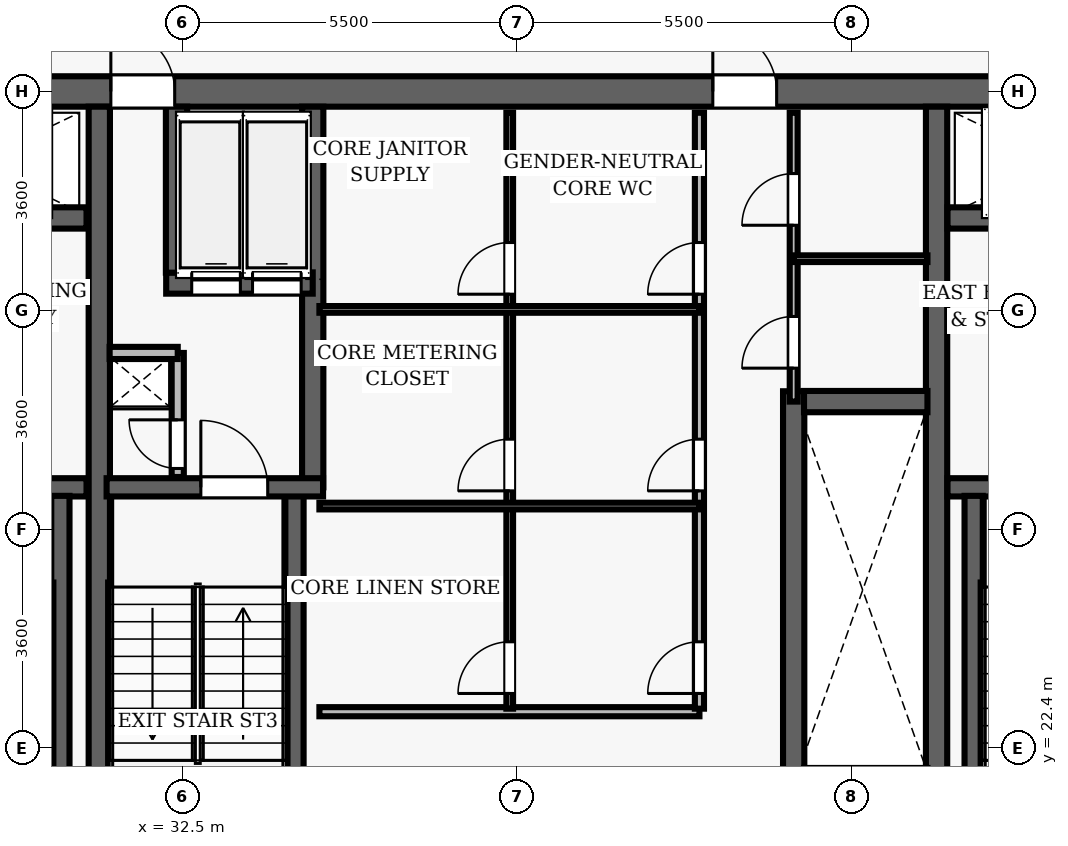
"""IFC4 building model, lengths in metres.
Left out: names, types, materials, properties, quantities, classifications, styles, units other than length and angle.
Written with IfcOpenShell. Run it as: python <this file> out.ifc"""

import sys

from ifc_helpers import new_model, si_unit, direction, frame, frame_2d, origin, place, context, subcontext, project, spatial, rectangle, extrude, element, fill, save


model = new_model("IFC4")
c1 = context("Model", 3, precision=1e-05, world=origin(), true_north=direction((0.0, 1.0)))
c2 = subcontext(c1, "Body", "Model", "MODEL_VIEW")
j1 = project(units=[si_unit("LENGTHUNIT", "METRE"), si_unit("PLANEANGLEUNIT", "RADIAN")], contexts=[c1])
p1 = place(None, origin())
s1 = spatial("IfcSite", under=j1, at=p1, CompositionType="ELEMENT")
p2 = place(p1, origin())
s2 = spatial("IfcBuilding", under=s1, at=p2, CompositionType="ELEMENT")
p3 = place(p2, frame((0.0, 0.0, 175.05)))
s3 = spatial("IfcBuildingStorey", under=s2, at=p3, CompositionType="ELEMENT", Elevation=175.05)
p4 = place(p3, frame((26.75, 33.2, 0.0), z_axis=(0.0, 0.0, 1.0), x_axis=(1.0, 0.0, 0.0)))
e1 = element("IfcWall", 1, at=p4, inside=s3, PredefinedType="SHEAR", context=c2, shape_type="SweptSolid", body=[
    extrude(rectangle(XDim=22.5, YDim=0.5, at=frame_2d((11.25, 0.0))), origin(), (0.0, 0.0, 1.0), 3.85),
])
p5 = place(p4, frame((4.57, 0.0, 0.0)))
e2 = element("IfcOpeningElement", 2, at=p5, cuts=e1, PredefinedType="OPENING", context=c2, shape_type="SweptSolid", body=[
    extrude(rectangle(XDim=1.05, YDim=2.15, at=frame_2d((0.525, 1.075))), frame((0.0, 0.26, 0.0), z_axis=(0.0, -1.0, 0.0), x_axis=(1.0, 0.0, 0.0)), (0.0, 0.0, 1.0), 0.52),
])
p6 = place(p4, frame((14.47, 0.0, 0.0)))
e3 = element("IfcOpeningElement", 3, at=p6, cuts=e1, PredefinedType="OPENING", context=c2, shape_type="SweptSolid", body=[
    extrude(rectangle(XDim=1.05, YDim=2.15, at=frame_2d((0.525, 1.075))), frame((0.0, 0.26, 0.0), z_axis=(0.0, -1.0, 0.0), x_axis=(1.0, 0.0, 0.0)), (0.0, 0.0, 1.0), 0.52),
])
for number, where, z_axis, x_axis in (
    (4, (31.13, 19.05, 0.0), (0.0, 0.0, 1.0), (0.0, 1.0, 0.0)),
    (5, (44.9, 19.05, 0.0), (0.0, 0.0, 1.0), (0.0, 1.0, 0.0)),
):
    element("IfcWall", number, at=place(p3, frame(where, z_axis=z_axis, x_axis=x_axis)), inside=s3, PredefinedType="SHEAR", context=c2, shape_type="SweptSolid", body=[
        extrude(rectangle(XDim=13.9, YDim=0.35, at=frame_2d((6.95, 0.0))), origin(), (0.0, 0.0, 1.0), 3.85),
    ])
p7 = place(p3, frame((27.25, 26.69, 0.0), z_axis=(0.0, 0.0, 1.0), x_axis=(1.0, 0.0, 0.0)))
e6 = element("IfcWall", 6, at=p7, inside=s3, PredefinedType="SHEAR", context=c2, shape_type="SweptSolid", body=[
    extrude(rectangle(XDim=3.67, YDim=0.3, at=frame_2d((1.835, 0.0))), origin(), (0.0, 0.0, 1.0), 3.85),
])
p8 = place(p7, frame((1.05, 0.0, 0.0)))
e7 = element("IfcOpeningElement", 7, at=p8, cuts=e6, PredefinedType="OPENING", context=c2, shape_type="SweptSolid", body=[
    extrude(rectangle(XDim=1.1, YDim=2.15, at=frame_2d((0.55, 1.075))), frame((0.0, 0.16, 0.0), z_axis=(0.0, -1.0, 0.0), x_axis=(1.0, 0.0, 0.0)), (0.0, 0.0, 1.0), 0.32),
])
p9 = place(p3, frame((30.49, 19.05, 0.0), z_axis=(0.0, 0.0, 1.0), x_axis=(0.0, 1.0, 0.0)))
e8 = element("IfcWall", 8, at=p9, inside=s3, PredefinedType="SHEAR", context=c2, shape_type="SweptSolid", body=[
    extrude(rectangle(XDim=7.5, YDim=0.3, at=frame_2d((3.75, 0.0))), origin(), (0.0, 0.0, 1.0), 3.85),
])
p10 = place(p3, frame((27.25, 31.12, 0.0), z_axis=(0.0, 0.0, 1.0), x_axis=(1.0, 0.0, 0.0)))
e9 = element("IfcWall", 9, at=p10, inside=s3, PredefinedType="SHEAR", context=c2, shape_type="SweptSolid", body=[
    extrude(rectangle(XDim=3.67, YDim=0.35, at=frame_2d((1.835, 0.0))), origin(), (0.0, 0.0, 1.0), 3.035),
])
p11 = place(p10, frame((1.25, 0.0, 0.0)))
e10 = element("IfcOpeningElement", 10, at=p11, cuts=e9, PredefinedType="OPENING", context=c2, shape_type="SweptSolid", body=[
    extrude(rectangle(XDim=1.1, YDim=2.15, at=frame_2d((0.55, 1.075))), frame((0.0, 0.185, 0.0), z_axis=(0.0, -1.0, 0.0), x_axis=(1.0, 0.0, 0.0)), (0.0, 0.0, 1.0), 0.37),
])
p12 = place(p3, frame((45.08, 26.69, 0.0), z_axis=(0.0, 0.0, 1.0), x_axis=(1.0, 0.0, 0.0)))
e11 = element("IfcWall", 11, at=p12, inside=s3, PredefinedType="SHEAR", context=c2, shape_type="SweptSolid", body=[
    extrude(rectangle(XDim=3.67, YDim=0.3, at=frame_2d((1.835, 0.0))), origin(), (0.0, 0.0, 1.0), 3.85),
])
p13 = place(p12, frame((1.05, 0.0, 0.0)))
e12 = element("IfcOpeningElement", 12, at=p13, cuts=e11, PredefinedType="OPENING", context=c2, shape_type="SweptSolid", body=[
    extrude(rectangle(XDim=1.1, YDim=2.15, at=frame_2d((0.55, 1.075))), frame((0.0, 0.16, 0.0), z_axis=(0.0, -1.0, 0.0), x_axis=(1.0, 0.0, 0.0)), (0.0, 0.0, 1.0), 0.32),
])
p14 = place(p3, frame((45.51, 19.05, 0.0), z_axis=(0.0, 0.0, 1.0), x_axis=(0.0, 1.0, 0.0)))
e13 = element("IfcWall", 13, at=p14, inside=s3, PredefinedType="SHEAR", context=c2, shape_type="SweptSolid", body=[
    extrude(rectangle(XDim=7.5, YDim=0.3, at=frame_2d((3.75, 0.0))), origin(), (0.0, 0.0, 1.0), 3.85),
])
p15 = place(p3, frame((45.08, 31.12, 0.0), z_axis=(0.0, 0.0, 1.0), x_axis=(1.0, 0.0, 0.0)))
e14 = element("IfcWall", 14, at=p15, inside=s3, PredefinedType="SHEAR", context=c2, shape_type="SweptSolid", body=[
    extrude(rectangle(XDim=3.67, YDim=0.35, at=frame_2d((1.835, 0.0))), origin(), (0.0, 0.0, 1.0), 3.035),
])
p16 = place(p15, frame((1.25, 0.0, 0.0)))
e15 = element("IfcOpeningElement", 15, at=p16, cuts=e14, PredefinedType="OPENING", context=c2, shape_type="SweptSolid", body=[
    extrude(rectangle(XDim=1.1, YDim=2.15, at=frame_2d((0.55, 1.075))), frame((0.0, 0.185, 0.0), z_axis=(0.0, -1.0, 0.0), x_axis=(1.0, 0.0, 0.0)), (0.0, 0.0, 1.0), 0.37),
])
p17 = place(p3, frame((34.34, 19.05, 0.0), z_axis=(0.0, 0.0, 1.0), x_axis=(0.0, 1.0, 0.0)))
e16 = element("IfcWall", 16, at=p17, inside=s3, PredefinedType="SHEAR", context=c2, shape_type="SweptSolid", body=[
    extrude(rectangle(XDim=7.5, YDim=0.3, at=frame_2d((3.75, 0.0))), origin(), (0.0, 0.0, 1.0), 3.85),
])
p18 = place(p3, frame((34.64, 26.69, 0.0), z_axis=(0.0, 0.0, 1.0), x_axis=(0.0, 1.0, 0.0)))
e17 = element("IfcWall", 17, at=p18, inside=s3, PredefinedType="SHEAR", context=c2, shape_type="SweptSolid", body=[
    extrude(rectangle(XDim=6.26, YDim=0.35, at=frame_2d((3.13, 0.0))), origin(), (0.0, 0.0, 1.0), 3.85),
])
p19 = place(p3, frame((31.25, 26.69, 0.0), z_axis=(0.0, 0.0, 1.0), x_axis=(1.0, 0.0, 0.0)))
e18 = element("IfcWall", 18, at=p19, inside=s3, PredefinedType="SHEAR", context=c2, shape_type="SweptSolid", body=[
    extrude(rectangle(XDim=3.56, YDim=0.3, at=frame_2d((1.78, 0.0))), origin(), (0.0, 0.0, 1.0), 3.85),
])
p20 = place(p19, frame((1.55, 0.0, 0.0)))
e19 = element("IfcOpeningElement", 19, at=p20, cuts=e18, PredefinedType="OPENING", context=c2, shape_type="SweptSolid", body=[
    extrude(rectangle(XDim=1.1, YDim=2.15, at=frame_2d((0.55, 1.075))), frame((0.0, 0.16, 0.0), z_axis=(0.0, -1.0, 0.0), x_axis=(1.0, 0.0, 0.0)), (0.0, 0.0, 1.0), 0.32),
])
p21 = place(p3, frame((32.23, 30.05, 0.0), z_axis=(0.0, 0.0, 1.0), x_axis=(1.0, 0.0, 0.0)))
e20 = element("IfcWall", 20, at=p21, inside=s3, PredefinedType="SHEAR", context=c2, shape_type="SweptSolid", body=[
    extrude(rectangle(XDim=2.41, YDim=0.35, at=frame_2d((1.205, 0.0))), origin(), (0.0, 0.0, 1.0), 3.035),
])
p22 = place(p21, frame((0.42, 0.0, 0.0)))
e21 = element("IfcOpeningElement", 21, at=p22, cuts=e20, PredefinedType="OPENING", context=c2, shape_type="SweptSolid", body=[
    extrude(rectangle(XDim=0.8, YDim=2.15, at=frame_2d((0.4, 1.075))), frame((0.0, 0.185, 0.0), z_axis=(0.0, -1.0, 0.0), x_axis=(1.0, 0.0, 0.0)), (0.0, 0.0, 1.0), 0.37),
])
p23 = place(p21, frame((1.42, 0.0, 0.0)))
e22 = element("IfcOpeningElement", 22, at=p23, cuts=e20, PredefinedType="OPENING", context=c2, shape_type="SweptSolid", body=[
    extrude(rectangle(XDim=0.8, YDim=2.15, at=frame_2d((0.4, 1.075))), frame((0.0, 0.185, 0.0), z_axis=(0.0, -1.0, 0.0), x_axis=(1.0, 0.0, 0.0)), (0.0, 0.0, 1.0), 0.37),
])
p24 = place(p3, frame((32.4, 30.22, 0.0), z_axis=(0.0, 0.0, 1.0), x_axis=(0.0, 1.0, 0.0)))
e23 = element("IfcWall", 23, at=p24, inside=s3, PredefinedType="SHEAR", context=c2, shape_type="SweptSolid", body=[
    extrude(rectangle(XDim=2.73, YDim=0.35, at=frame_2d((1.365, 0.0))), origin(), (0.0, 0.0, 1.0), 3.035),
])
p25 = place(p3, frame((32.42, 26.86, 0.0), z_axis=(0.0, 0.0, 1.0), x_axis=(0.0, 1.0, 0.0)))
e24 = element("IfcWall", 24, at=p25, inside=s3, PredefinedType="PARTITIONING", context=c2, shape_type="SweptSolid", body=[
    extrude(rectangle(XDim=2.04, YDim=0.2, at=frame_2d((1.02, 0.0))), origin(), (0.0, 0.0, 1.0), 3.035),
])
p26 = place(p25, frame((0.14, 0.0, 0.0)))
e25 = element("IfcOpeningElement", 25, at=p26, cuts=e24, PredefinedType="OPENING", context=c2, shape_type="SweptSolid", body=[
    extrude(rectangle(XDim=0.8, YDim=2.05, at=frame_2d((0.4, 1.025))), frame((0.0, 0.11, 0.0), z_axis=(0.0, -1.0, 0.0), x_axis=(1.0, 0.0, 0.0)), (0.0, 0.0, 1.0), 0.22),
])
p27 = place(p3, frame((31.3, 28.9, 0.0), z_axis=(0.0, 0.0, 1.0), x_axis=(1.0, 0.0, 0.0)))
e26 = element("IfcWall", 26, at=p27, inside=s3, PredefinedType="PARTITIONING", context=c2, shape_type="SweptSolid", body=[
    extrude(rectangle(XDim=1.12, YDim=0.2, at=frame_2d((0.56, 0.0))), origin(), (0.0, 0.0, 1.0), 3.035),
])
p28 = place(p3, frame((42.55, 21.73, 0.0), z_axis=(0.0, 0.0, 1.0), x_axis=(0.0, 1.0, 0.0)))
e27 = element("IfcWall", 27, at=p28, inside=s3, PredefinedType="SHEAR", context=c2, shape_type="SweptSolid", body=[
    extrude(rectangle(XDim=6.54, YDim=0.35, at=frame_2d((3.27, 0.0))), origin(), (0.0, 0.0, 1.0), 3.035),
])
p29 = place(p3, frame((42.72, 28.1, 0.0), z_axis=(0.0, 0.0, 1.0), x_axis=(1.0, 0.0, 0.0)))
e28 = element("IfcWall", 28, at=p29, inside=s3, PredefinedType="SHEAR", context=c2, shape_type="SweptSolid", body=[
    extrude(rectangle(XDim=2.03, YDim=0.35, at=frame_2d((1.015, 0.0))), origin(), (0.0, 0.0, 1.0), 3.035),
])
p30 = place(p3, frame((34.75, 23.0, 0.0), z_axis=(0.0, 0.0, 1.0), x_axis=(1.0, 0.0, 0.0)))
e29 = element("IfcWall", 29, at=p30, inside=s3, PredefinedType="PARTITIONING", context=c2, shape_type="SweptSolid", body=[
    extrude(rectangle(XDim=6.25, YDim=0.15, at=frame_2d((3.125, 0.0))), origin(), (0.0, 0.0, 1.0), 3.035),
])
p31 = place(p3, frame((41.0, 23.05, 0.0), z_axis=(0.0, 0.0, 1.0), x_axis=(0.0, 1.0, 0.0)))
e30 = element("IfcWall", 30, at=p31, inside=s3, PredefinedType="PARTITIONING", context=c2, shape_type="SweptSolid", body=[
    extrude(rectangle(XDim=9.8, YDim=0.15, at=frame_2d((4.9, 0.0))), origin(), (0.0, 0.0, 1.0), 3.035),
])
p32 = place(p31, frame((0.25, 0.0, 0.0)))
e31 = element("IfcOpeningElement", 31, at=p32, cuts=e30, PredefinedType="OPENING", context=c2, shape_type="SweptSolid", body=[
    extrude(rectangle(XDim=0.85, YDim=2.1, at=frame_2d((0.425, 1.05))), frame((0.0, 0.085, 0.0), z_axis=(0.0, -1.0, 0.0), x_axis=(1.0, 0.0, 0.0)), (0.0, 0.0, 1.0), 0.17),
])
p33 = place(p31, frame((3.582, 0.0, 0.0)))
e32 = element("IfcOpeningElement", 32, at=p33, cuts=e30, PredefinedType="OPENING", context=c2, shape_type="SweptSolid", body=[
    extrude(rectangle(XDim=0.85, YDim=2.1, at=frame_2d((0.425, 1.05))), frame((0.0, 0.085, 0.0), z_axis=(0.0, -1.0, 0.0), x_axis=(1.0, 0.0, 0.0)), (0.0, 0.0, 1.0), 0.17),
])
p34 = place(p31, frame((6.816, 0.0, 0.0)))
e33 = element("IfcOpeningElement", 33, at=p34, cuts=e30, PredefinedType="OPENING", context=c2, shape_type="SweptSolid", body=[
    extrude(rectangle(XDim=0.85, YDim=2.1, at=frame_2d((0.425, 1.05))), frame((0.0, 0.085, 0.0), z_axis=(0.0, -1.0, 0.0), x_axis=(1.0, 0.0, 0.0)), (0.0, 0.0, 1.0), 0.17),
])
p35 = place(p3, frame((37.88, 23.05, 0.0), z_axis=(0.0, 0.0, 1.0), x_axis=(0.0, 1.0, 0.0)))
e34 = element("IfcWall", 34, at=p35, inside=s3, PredefinedType="PARTITIONING", context=c2, shape_type="SweptSolid", body=[
    extrude(rectangle(XDim=9.8, YDim=0.11, at=frame_2d((4.9, 0.0))), origin(), (0.0, 0.0, 1.0), 3.035),
])
p36 = place(p35, frame((0.25, 0.0, 0.0)))
e35 = element("IfcOpeningElement", 35, at=p36, cuts=e34, PredefinedType="OPENING", context=c2, shape_type="SweptSolid", body=[
    extrude(rectangle(XDim=0.85, YDim=2.1, at=frame_2d((0.425, 1.05))), frame((0.0, 0.065, 0.0), z_axis=(0.0, -1.0, 0.0), x_axis=(1.0, 0.0, 0.0)), (0.0, 0.0, 1.0), 0.13),
])
p37 = place(p35, frame((3.582, 0.0, 0.0)))
e36 = element("IfcOpeningElement", 36, at=p37, cuts=e34, PredefinedType="OPENING", context=c2, shape_type="SweptSolid", body=[
    extrude(rectangle(XDim=0.85, YDim=2.1, at=frame_2d((0.425, 1.05))), frame((0.0, 0.065, 0.0), z_axis=(0.0, -1.0, 0.0), x_axis=(1.0, 0.0, 0.0)), (0.0, 0.0, 1.0), 0.13),
])
p38 = place(p35, frame((6.816, 0.0, 0.0)))
e37 = element("IfcOpeningElement", 37, at=p38, cuts=e34, PredefinedType="OPENING", context=c2, shape_type="SweptSolid", body=[
    extrude(rectangle(XDim=0.85, YDim=2.1, at=frame_2d((0.425, 1.05))), frame((0.0, 0.065, 0.0), z_axis=(0.0, -1.0, 0.0), x_axis=(1.0, 0.0, 0.0)), (0.0, 0.0, 1.0), 0.13),
])
for number, where, z_axis, x_axis in (
    (38, (34.75, 26.382, 0.0), (0.0, 0.0, 1.0), (1.0, 0.0, 0.0)),
    (39, (34.75, 29.616, 0.0), (0.0, 0.0, 1.0), (1.0, 0.0, 0.0)),
):
    element("IfcWall", number, at=place(p3, frame(where, z_axis=z_axis, x_axis=x_axis)), inside=s3, PredefinedType="PARTITIONING", context=c2, shape_type="SweptSolid", body=[
        extrude(rectangle(XDim=6.25, YDim=0.11, at=frame_2d((3.125, 0.0))), origin(), (0.0, 0.0, 1.0), 3.035),
    ])
p39 = place(p3, frame((42.55, 28.1, 0.0), z_axis=(0.0, 0.0, 1.0), x_axis=(0.0, 1.0, 0.0)))
e40 = element("IfcWall", 40, at=p39, inside=s3, PredefinedType="PARTITIONING", context=c2, shape_type="SweptSolid", body=[
    extrude(rectangle(XDim=4.75, YDim=0.13, at=frame_2d((2.375, 0.0))), origin(), (0.0, 0.0, 1.0), 3.035),
])
p40 = place(p39, frame((0.55, 0.0, 0.0)))
e41 = element("IfcOpeningElement", 41, at=p40, cuts=e40, PredefinedType="OPENING", context=c2, shape_type="SweptSolid", body=[
    extrude(rectangle(XDim=0.85, YDim=2.1, at=frame_2d((0.425, 1.05))), frame((0.0, 0.075, 0.0), z_axis=(0.0, -1.0, 0.0), x_axis=(1.0, 0.0, 0.0)), (0.0, 0.0, 1.0), 0.15),
])
p41 = place(p39, frame((2.9, 0.0, 0.0)))
e42 = element("IfcOpeningElement", 42, at=p41, cuts=e40, PredefinedType="OPENING", context=c2, shape_type="SweptSolid", body=[
    extrude(rectangle(XDim=0.85, YDim=2.1, at=frame_2d((0.425, 1.05))), frame((0.0, 0.075, 0.0), z_axis=(0.0, -1.0, 0.0), x_axis=(1.0, 0.0, 0.0)), (0.0, 0.0, 1.0), 0.15),
])
p42 = place(p3, frame((42.55, 30.45, 0.0), z_axis=(0.0, 0.0, 1.0), x_axis=(1.0, 0.0, 0.0)))
e43 = element("IfcWall", 43, at=p42, inside=s3, PredefinedType="PARTITIONING", context=c2, shape_type="SweptSolid", body=[
    extrude(rectangle(XDim=2.2, YDim=0.11, at=frame_2d((1.1, 0.0))), origin(), (0.0, 0.0, 1.0), 3.035),
])
p43 = place(p20, origin())
e44 = element("IfcDoor", 44, at=p43, inside=s3, OperationType="SINGLE_SWING_LEFT", PredefinedType="DOOR", context=c2, shape_type="SweptSolid", body=[
    extrude(rectangle(XDim=1.1, YDim=2.15, at=frame_2d((0.55, 1.075))), frame((0.0, 0.025, 0.0), z_axis=(0.0, -1.0, 0.0), x_axis=(1.0, 0.0, 0.0)), (0.0, 0.0, 1.0), 0.05),
])
fill(e19, e44)
p44 = place(p26, origin())
e45 = element("IfcDoor", 45, at=p44, inside=s3, OperationType="SINGLE_SWING_RIGHT", PredefinedType="DOOR", context=c2, shape_type="SweptSolid", body=[
    extrude(rectangle(XDim=0.8, YDim=2.05, at=frame_2d((0.4, 1.025))), frame((0.0, 0.025, 0.0), z_axis=(0.0, -1.0, 0.0), x_axis=(1.0, 0.0, 0.0)), (0.0, 0.0, 1.0), 0.05),
])
fill(e25, e45)
p45 = place(p5, origin())
e46 = element("IfcDoor", 46, at=p45, inside=s3, OperationType="SINGLE_SWING_LEFT", PredefinedType="DOOR", context=c2, shape_type="SweptSolid", body=[
    extrude(rectangle(XDim=1.05, YDim=2.15, at=frame_2d((0.525, 1.075))), frame((0.0, 0.025, 0.0), z_axis=(0.0, -1.0, 0.0), x_axis=(1.0, 0.0, 0.0)), (0.0, 0.0, 1.0), 0.05),
])
fill(e2, e46)
p46 = place(p6, origin())
e47 = element("IfcDoor", 47, at=p46, inside=s3, OperationType="SINGLE_SWING_LEFT", PredefinedType="DOOR", context=c2, shape_type="SweptSolid", body=[
    extrude(rectangle(XDim=1.05, YDim=2.15, at=frame_2d((0.525, 1.075))), frame((0.0, 0.025, 0.0), z_axis=(0.0, -1.0, 0.0), x_axis=(1.0, 0.0, 0.0)), (0.0, 0.0, 1.0), 0.05),
])
fill(e3, e47)
p47 = place(p32, origin())
e48 = element("IfcDoor", 48, at=p47, inside=s3, OperationType="SINGLE_SWING_LEFT", PredefinedType="DOOR", context=c2, shape_type="SweptSolid", body=[
    extrude(rectangle(XDim=0.85, YDim=2.1, at=frame_2d((0.425, 1.05))), frame((0.0, 0.025, 0.0), z_axis=(0.0, -1.0, 0.0), x_axis=(1.0, 0.0, 0.0)), (0.0, 0.0, 1.0), 0.05),
])
fill(e31, e48)
p48 = place(p36, origin())
e49 = element("IfcDoor", 49, at=p48, inside=s3, OperationType="SINGLE_SWING_LEFT", PredefinedType="DOOR", context=c2, shape_type="SweptSolid", body=[
    extrude(rectangle(XDim=0.85, YDim=2.1, at=frame_2d((0.425, 1.05))), frame((0.0, 0.025, 0.0), z_axis=(0.0, -1.0, 0.0), x_axis=(1.0, 0.0, 0.0)), (0.0, 0.0, 1.0), 0.05),
])
fill(e35, e49)
p49 = place(p33, origin())
e50 = element("IfcDoor", 50, at=p49, inside=s3, OperationType="SINGLE_SWING_LEFT", PredefinedType="DOOR", context=c2, shape_type="SweptSolid", body=[
    extrude(rectangle(XDim=0.85, YDim=2.1, at=frame_2d((0.425, 1.05))), frame((0.0, 0.025, 0.0), z_axis=(0.0, -1.0, 0.0), x_axis=(1.0, 0.0, 0.0)), (0.0, 0.0, 1.0), 0.05),
])
fill(e32, e50)
p50 = place(p37, origin())
e51 = element("IfcDoor", 51, at=p50, inside=s3, OperationType="SINGLE_SWING_LEFT", PredefinedType="DOOR", context=c2, shape_type="SweptSolid", body=[
    extrude(rectangle(XDim=0.85, YDim=2.1, at=frame_2d((0.425, 1.05))), frame((0.0, 0.025, 0.0), z_axis=(0.0, -1.0, 0.0), x_axis=(1.0, 0.0, 0.0)), (0.0, 0.0, 1.0), 0.05),
])
fill(e36, e51)
p51 = place(p34, origin())
e52 = element("IfcDoor", 52, at=p51, inside=s3, OperationType="SINGLE_SWING_LEFT", PredefinedType="DOOR", context=c2, shape_type="SweptSolid", body=[
    extrude(rectangle(XDim=0.85, YDim=2.1, at=frame_2d((0.425, 1.05))), frame((0.0, 0.025, 0.0), z_axis=(0.0, -1.0, 0.0), x_axis=(1.0, 0.0, 0.0)), (0.0, 0.0, 1.0), 0.05),
])
fill(e33, e52)
p52 = place(p38, origin())
e53 = element("IfcDoor", 53, at=p52, inside=s3, OperationType="SINGLE_SWING_LEFT", PredefinedType="DOOR", context=c2, shape_type="SweptSolid", body=[
    extrude(rectangle(XDim=0.85, YDim=2.1, at=frame_2d((0.425, 1.05))), frame((0.0, 0.025, 0.0), z_axis=(0.0, -1.0, 0.0), x_axis=(1.0, 0.0, 0.0)), (0.0, 0.0, 1.0), 0.05),
])
fill(e37, e53)
p53 = place(p40, origin())
e54 = element("IfcDoor", 54, at=p53, inside=s3, OperationType="SINGLE_SWING_LEFT", PredefinedType="DOOR", context=c2, shape_type="SweptSolid", body=[
    extrude(rectangle(XDim=0.85, YDim=2.1, at=frame_2d((0.425, 1.05))), frame((0.0, 0.025, 0.0), z_axis=(0.0, -1.0, 0.0), x_axis=(1.0, 0.0, 0.0)), (0.0, 0.0, 1.0), 0.05),
])
fill(e41, e54)
p54 = place(p41, origin())
e55 = element("IfcDoor", 55, at=p54, inside=s3, OperationType="SINGLE_SWING_LEFT", PredefinedType="DOOR", context=c2, shape_type="SweptSolid", body=[
    extrude(rectangle(XDim=0.85, YDim=2.1, at=frame_2d((0.425, 1.05))), frame((0.0, 0.025, 0.0), z_axis=(0.0, -1.0, 0.0), x_axis=(1.0, 0.0, 0.0)), (0.0, 0.0, 1.0), 0.05),
])
fill(e42, e55)
p55 = place(p22, origin())
e56 = element("IfcDoor", 56, at=p55, inside=s3, OperationType="SLIDING_TO_LEFT", PredefinedType="DOOR", context=c2, shape_type="SweptSolid", body=[
    extrude(rectangle(XDim=0.8, YDim=2.15, at=frame_2d((0.4, 1.075))), frame((0.0, 0.025, 0.0), z_axis=(0.0, -1.0, 0.0), x_axis=(1.0, 0.0, 0.0)), (0.0, 0.0, 1.0), 0.05),
])
fill(e21, e56)
p56 = place(p23, origin())
e57 = element("IfcDoor", 57, at=p56, inside=s3, OperationType="SLIDING_TO_LEFT", PredefinedType="DOOR", context=c2, shape_type="SweptSolid", body=[
    extrude(rectangle(XDim=0.8, YDim=2.15, at=frame_2d((0.4, 1.075))), frame((0.0, 0.025, 0.0), z_axis=(0.0, -1.0, 0.0), x_axis=(1.0, 0.0, 0.0)), (0.0, 0.0, 1.0), 0.05),
])
fill(e22, e57)
save(model, sys.argv[1])
